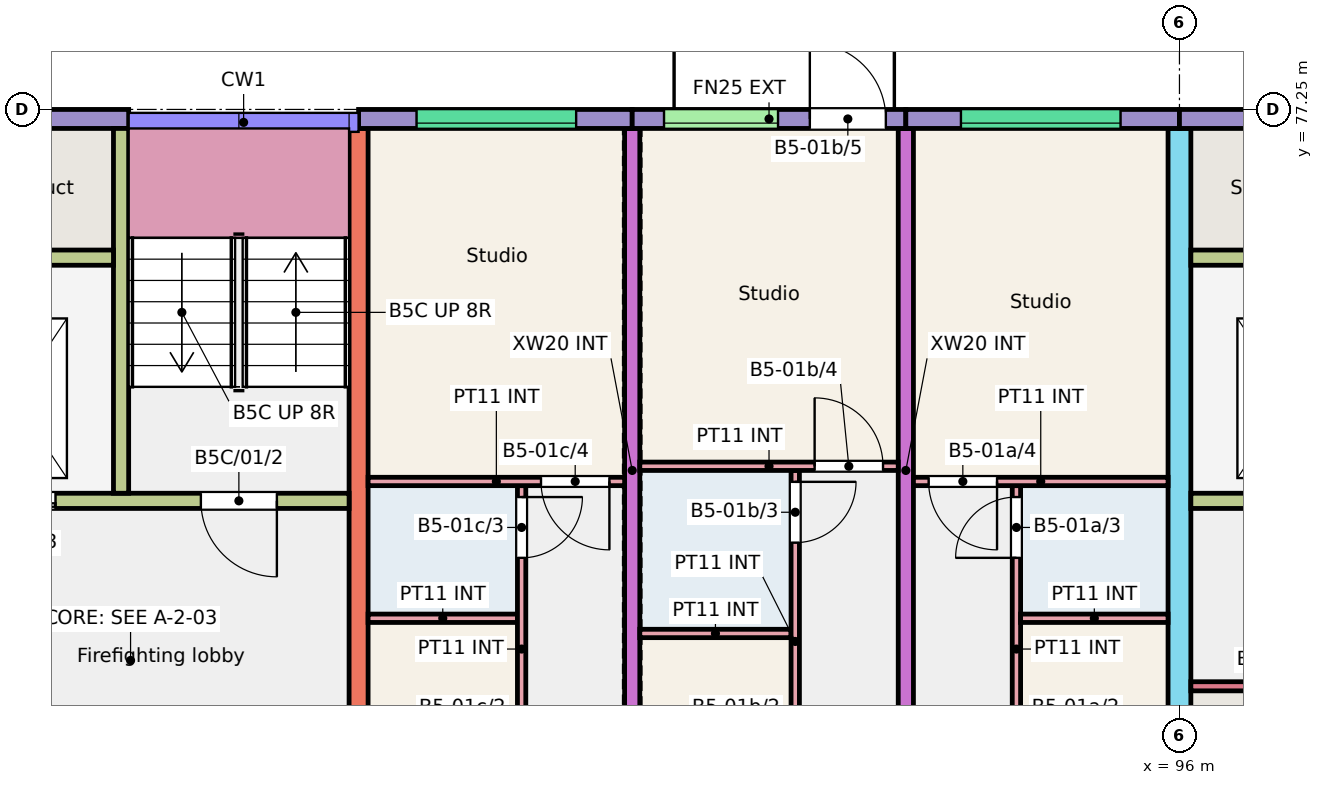
"""IFC4 building model, lengths in metres.
Left out: names, types, materials, properties, quantities, classifications, styles, units other than length and angle.
Written with IfcOpenShell. Run it as: python <this file> out.ifc"""

import sys

from ifc_helpers import new_model, si_unit, direction, frame, frame_2d, origin, place, context, subcontext, project, spatial, rectangle, extrude, element, fill, save


model = new_model("IFC4")
c1 = context("Model", 3, precision=1e-05, world=origin(), true_north=direction((0.0, 1.0)))
c2 = subcontext(c1, "Body", "Model", "MODEL_VIEW")
j1 = project(units=[si_unit("LENGTHUNIT", "METRE"), si_unit("PLANEANGLEUNIT", "RADIAN")], contexts=[c1])
p1 = place(None, origin())
s1 = spatial("IfcSite", under=j1, at=p1, CompositionType="ELEMENT")
p2 = place(p1, origin())
s2 = spatial("IfcBuilding", under=s1, at=p2, CompositionType="ELEMENT")
p3 = place(p2, frame((0.0, 0.0, 3.0)))
s3 = spatial("IfcBuildingStorey", under=s2, at=p3, CompositionType="ELEMENT", Elevation=3.0)
p4 = place(p3, frame((85.2, 68.0, 0.0), z_axis=(0.0, 0.0, 1.0), x_axis=(0.0, 1.0, 0.0)))
e1 = element("IfcWall", 1, at=p4, inside=s3, PredefinedType="SHEAR", context=c2, shape_type="SweptSolid", body=[
    extrude(rectangle(XDim=9.0, YDim=0.25, at=frame_2d((4.5, 0.0))), origin(), (0.0, 0.0, 1.0), 3.0),
])
for number, where, z_axis, x_axis in (
    (2, (88.8, 68.0, 0.0), (0.0, 0.0, 1.0), (0.0, 1.0, 0.0)),
    (3, (92.4, 68.0, 0.0), (0.0, 0.0, 1.0), (0.0, 1.0, 0.0)),
):
    element("IfcWall", number, at=place(p3, frame(where, z_axis=z_axis, x_axis=x_axis)), inside=s3, PredefinedType="SHEAR", context=c2, shape_type="SweptSolid", body=[
        extrude(rectangle(XDim=9.0, YDim=0.2, at=frame_2d((4.5, 0.0))), origin(), (0.0, 0.0, 1.0), 3.0),
    ])
p5 = place(p3, frame((96.0, 66.0, 0.0), z_axis=(0.0, 0.0, 1.0), x_axis=(0.0, 1.0, 0.0)))
e4 = element("IfcWall", 4, at=p5, inside=s3, PredefinedType="SHEAR", context=c2, shape_type="SweptSolid", body=[
    extrude(rectangle(XDim=11.0, YDim=0.3, at=frame_2d((5.5, 0.0))), origin(), (0.0, 0.0, 1.0), 3.0),
])
p6 = place(p5, frame((0.3, 0.0, 0.0)))
e5 = element("IfcOpeningElement", 5, at=p6, cuts=e4, PredefinedType="OPENING", context=c2, shape_type="SweptSolid", body=[
    extrude(rectangle(XDim=1.2, YDim=2.1, at=frame_2d((0.6, 1.05))), frame((0.0, 0.16, 0.0), z_axis=(0.0, -1.0, 0.0), x_axis=(1.0, 0.0, 0.0)), (0.0, 0.0, 1.0), 0.32),
])
p7 = place(p3, frame((79.2, 77.125, 0.0), z_axis=(0.0, 0.0, 1.0), x_axis=(1.0, 0.0, 0.0)))
e6 = element("IfcWall", 6, at=p7, inside=s3, PredefinedType="SOLIDWALL", context=c2, shape_type="SweptSolid", body=[
    extrude(rectangle(XDim=2.975, YDim=0.25, at=frame_2d((1.488, 0.0))), origin(), (0.0, 0.0, 1.0), 3.0),
])
p8 = place(p3, frame((79.35, 72.1, 0.0), z_axis=(0.0, 0.0, 1.0), x_axis=(1.0, 0.0, 0.0)))
e7 = element("IfcWall", 7, at=p8, inside=s3, PredefinedType="SHEAR", context=c2, shape_type="SweptSolid", body=[
    extrude(rectangle(XDim=5.725, YDim=0.2, at=frame_2d((2.862, 0.0))), origin(), (0.0, 0.0, 1.0), 3.0),
])
p9 = place(p8, frame((3.775, 0.0, 0.0)))
e8 = element("IfcOpeningElement", 8, at=p9, cuts=e7, PredefinedType="OPENING", context=c2, shape_type="SweptSolid", body=[
    extrude(rectangle(XDim=1.0, YDim=2.1, at=frame_2d((0.5, 1.05))), frame((0.0, 0.11, 0.0), z_axis=(0.0, -1.0, 0.0), x_axis=(1.0, 0.0, 0.0)), (0.0, 0.0, 1.0), 0.22),
])
p10 = place(p8, frame((0.762, 0.0, 0.0)))
e9 = element("IfcOpeningElement", 9, at=p10, cuts=e7, PredefinedType="OPENING", context=c2, shape_type="SweptSolid", body=[
    extrude(rectangle(XDim=1.1, YDim=2.1, at=frame_2d((0.55, 1.05))), frame((0.0, 0.11, 0.0), z_axis=(0.0, -1.0, 0.0), x_axis=(1.0, 0.0, 0.0)), (0.0, 0.0, 1.0), 0.22),
])
p11 = place(p3, frame((82.075, 72.2, 0.0), z_axis=(0.0, 0.0, 1.0), x_axis=(0.0, 1.0, 0.0)))
e10 = element("IfcWall", 10, at=p11, inside=s3, PredefinedType="SHEAR", context=c2, shape_type="SweptSolid", body=[
    extrude(rectangle(XDim=4.8, YDim=0.2, at=frame_2d((2.4, 0.0))), origin(), (0.0, 0.0, 1.0), 3.0),
])
p12 = place(p3, frame((79.35, 75.3, 0.0), z_axis=(0.0, 0.0, 1.0), x_axis=(1.0, 0.0, 0.0)))
e11 = element("IfcWall", 11, at=p12, inside=s3, PredefinedType="SHEAR", context=c2, shape_type="SweptSolid", body=[
    extrude(rectangle(XDim=2.625, YDim=0.2, at=frame_2d((1.312, 0.0))), origin(), (0.0, 0.0, 1.0), 3.0),
])
p13 = place(p3, frame((85.2, 77.125, 0.0), z_axis=(0.0, 0.0, 1.0), x_axis=(1.0, 0.0, 0.0)))
e12 = element("IfcWall", 12, at=p13, inside=s3, PredefinedType="SOLIDWALL", context=c2, shape_type="SweptSolid", body=[
    extrude(rectangle(XDim=3.6, YDim=0.25, at=frame_2d((1.8, 0.0))), origin(), (0.0, 0.0, 1.0), 3.0),
])
p14 = place(p13, frame((0.762, 0.0, 1.2)))
e13 = element("IfcOpeningElement", 13, at=p14, cuts=e12, PredefinedType="OPENING", context=c2, shape_type="SweptSolid", body=[
    extrude(rectangle(XDim=2.1, YDim=1.2, at=frame_2d((1.05, 0.6))), frame((0.0, 0.135, 0.0), z_axis=(0.0, -1.0, 0.0), x_axis=(1.0, 0.0, 0.0)), (0.0, 0.0, 1.0), 0.27),
])
p15 = place(p3, frame((88.8, 77.125, 0.0), z_axis=(0.0, 0.0, 1.0), x_axis=(1.0, 0.0, 0.0)))
e14 = element("IfcWall", 14, at=p15, inside=s3, PredefinedType="SOLIDWALL", context=c2, shape_type="SweptSolid", body=[
    extrude(rectangle(XDim=3.6, YDim=0.25, at=frame_2d((1.8, 0.0))), origin(), (0.0, 0.0, 1.0), 3.0),
])
p16 = place(p15, frame((0.418, 0.0, 1.2)))
e15 = element("IfcOpeningElement", 15, at=p16, cuts=e14, PredefinedType="OPENING", context=c2, shape_type="SweptSolid", body=[
    extrude(rectangle(XDim=1.5, YDim=1.2, at=frame_2d((0.75, 0.6))), frame((0.0, 0.135, 0.0), z_axis=(0.0, -1.0, 0.0), x_axis=(1.0, 0.0, 0.0)), (0.0, 0.0, 1.0), 0.27),
])
p17 = place(p15, frame((2.337, 0.0, 0.0)))
e16 = element("IfcOpeningElement", 16, at=p17, cuts=e14, PredefinedType="OPENING", context=c2, shape_type="SweptSolid", body=[
    extrude(rectangle(XDim=1.0, YDim=2.1, at=frame_2d((0.5, 1.05))), frame((0.0, 0.135, 0.0), z_axis=(0.0, -1.0, 0.0), x_axis=(1.0, 0.0, 0.0)), (0.0, 0.0, 1.0), 0.27),
])
p18 = place(p3, frame((92.4, 77.125, 0.0), z_axis=(0.0, 0.0, 1.0), x_axis=(1.0, 0.0, 0.0)))
e17 = element("IfcWall", 17, at=p18, inside=s3, PredefinedType="SOLIDWALL", context=c2, shape_type="SweptSolid", body=[
    extrude(rectangle(XDim=3.6, YDim=0.25, at=frame_2d((1.8, 0.0))), origin(), (0.0, 0.0, 1.0), 3.0),
])
p19 = place(p18, frame((0.725, 0.0, 1.2)))
e18 = element("IfcOpeningElement", 18, at=p19, cuts=e17, PredefinedType="OPENING", context=c2, shape_type="SweptSolid", body=[
    extrude(rectangle(XDim=2.1, YDim=1.2, at=frame_2d((1.05, 0.6))), frame((0.0, 0.135, 0.0), z_axis=(0.0, -1.0, 0.0), x_axis=(1.0, 0.0, 0.0)), (0.0, 0.0, 1.0), 0.27),
])
p20 = place(p3, frame((96.0, 77.125, 0.0), z_axis=(0.0, 0.0, 1.0), x_axis=(1.0, 0.0, 0.0)))
e19 = element("IfcWall", 19, at=p20, inside=s3, PredefinedType="SOLIDWALL", context=c2, shape_type="SweptSolid", body=[
    extrude(rectangle(XDim=2.975, YDim=0.25, at=frame_2d((1.488, 0.0))), origin(), (0.0, 0.0, 1.0), 3.0),
])
p21 = place(p3, frame((96.15, 72.1, 0.0), z_axis=(0.0, 0.0, 1.0), x_axis=(1.0, 0.0, 0.0)))
e20 = element("IfcWall", 20, at=p21, inside=s3, PredefinedType="SHEAR", context=c2, shape_type="SweptSolid", body=[
    extrude(rectangle(XDim=5.725, YDim=0.2, at=frame_2d((2.863, 0.0))), origin(), (0.0, 0.0, 1.0), 3.0),
])
p22 = place(p21, frame((3.775, 0.0, 0.0)))
e21 = element("IfcOpeningElement", 21, at=p22, cuts=e20, PredefinedType="OPENING", context=c2, shape_type="SweptSolid", body=[
    extrude(rectangle(XDim=1.0, YDim=2.1, at=frame_2d((0.5, 1.05))), frame((0.0, 0.11, 0.0), z_axis=(0.0, -1.0, 0.0), x_axis=(1.0, 0.0, 0.0)), (0.0, 0.0, 1.0), 0.22),
])
p23 = place(p21, frame((0.762, 0.0, 0.0)))
e22 = element("IfcOpeningElement", 22, at=p23, cuts=e20, PredefinedType="OPENING", context=c2, shape_type="SweptSolid", body=[
    extrude(rectangle(XDim=1.1, YDim=2.1, at=frame_2d((0.55, 1.05))), frame((0.0, 0.11, 0.0), z_axis=(0.0, -1.0, 0.0), x_axis=(1.0, 0.0, 0.0)), (0.0, 0.0, 1.0), 0.22),
])
p24 = place(p3, frame((96.15, 75.3, 0.0), z_axis=(0.0, 0.0, 1.0), x_axis=(1.0, 0.0, 0.0)))
e23 = element("IfcWall", 23, at=p24, inside=s3, PredefinedType="SHEAR", context=c2, shape_type="SweptSolid", body=[
    extrude(rectangle(XDim=2.625, YDim=0.2, at=frame_2d((1.312, 0.0))), origin(), (0.0, 0.0, 1.0), 3.0),
])
p25 = place(p3, frame((96.15, 69.66, 0.0), z_axis=(0.0, 0.0, 1.0), x_axis=(1.0, 0.0, 0.0)))
e24 = element("IfcWall", 24, at=p25, inside=s3, PredefinedType="SHEAR", context=c2, shape_type="SweptSolid", body=[
    extrude(rectangle(XDim=1.13, YDim=0.12, at=frame_2d((0.565, 0.0))), origin(), (0.0, 0.0, 1.0), 3.0),
])
p26 = place(p3, frame((93.855, 68.0, 0.0), z_axis=(0.0, 0.0, 1.0), x_axis=(0.0, 1.0, 0.0)))
e25 = element("IfcWall", 25, at=p26, inside=s3, PredefinedType="PARTITIONING", context=c2, shape_type="SweptSolid", body=[
    extrude(rectangle(XDim=4.3, YDim=0.11, at=frame_2d((2.15, 0.0))), origin(), (0.0, 0.0, 1.0), 2.8),
])
p27 = place(p26, frame((0.2, 0.0, 0.0)))
e26 = element("IfcOpeningElement", 26, at=p27, cuts=e25, PredefinedType="OPENING", context=c2, shape_type="SweptSolid", body=[
    extrude(rectangle(XDim=0.8, YDim=2.1, at=frame_2d((0.4, 1.05))), frame((0.0, 0.065, 0.0), z_axis=(0.0, -1.0, 0.0), x_axis=(1.0, 0.0, 0.0)), (0.0, 0.0, 1.0), 0.13),
])
p28 = place(p26, frame((3.35, 0.0, 0.0)))
e27 = element("IfcOpeningElement", 27, at=p28, cuts=e25, PredefinedType="OPENING", context=c2, shape_type="SweptSolid", body=[
    extrude(rectangle(XDim=0.8, YDim=2.1, at=frame_2d((0.4, 1.05))), frame((0.0, 0.065, 0.0), z_axis=(0.0, -1.0, 0.0), x_axis=(1.0, 0.0, 0.0)), (0.0, 0.0, 1.0), 0.13),
])
p29 = place(p3, frame((93.91, 70.555, 0.0), z_axis=(0.0, 0.0, 1.0), x_axis=(1.0, 0.0, 0.0)))
e28 = element("IfcWall", 28, at=p29, inside=s3, PredefinedType="PARTITIONING", context=c2, shape_type="SweptSolid", body=[
    extrude(rectangle(XDim=1.94, YDim=0.11, at=frame_2d((0.97, 0.0))), origin(), (0.0, 0.0, 1.0), 2.8),
])
p30 = place(p3, frame((92.5, 72.355, 0.0), z_axis=(0.0, 0.0, 1.0), x_axis=(1.0, 0.0, 0.0)))
e29 = element("IfcWall", 29, at=p30, inside=s3, PredefinedType="PARTITIONING", context=c2, shape_type="SweptSolid", body=[
    extrude(rectangle(XDim=3.35, YDim=0.11, at=frame_2d((1.675, 0.0))), origin(), (0.0, 0.0, 1.0), 2.8),
])
p31 = place(p30, frame((0.2, 0.0, 0.0)))
e30 = element("IfcOpeningElement", 30, at=p31, cuts=e29, PredefinedType="OPENING", context=c2, shape_type="SweptSolid", body=[
    extrude(rectangle(XDim=0.9, YDim=2.1, at=frame_2d((0.45, 1.05))), frame((0.0, 0.065, 0.0), z_axis=(0.0, -1.0, 0.0), x_axis=(1.0, 0.0, 0.0)), (0.0, 0.0, 1.0), 0.13),
])
p32 = place(p3, frame((88.9, 70.355, 0.0), z_axis=(0.0, 0.0, 1.0), x_axis=(1.0, 0.0, 0.0)))
e31 = element("IfcWall", 31, at=p32, inside=s3, PredefinedType="PARTITIONING", context=c2, shape_type="SweptSolid", body=[
    extrude(rectangle(XDim=1.99, YDim=0.11, at=frame_2d((0.995, 0.0))), origin(), (0.0, 0.0, 1.0), 2.8),
])
p33 = place(p3, frame((90.945, 68.0, 0.0), z_axis=(0.0, 0.0, 1.0), x_axis=(0.0, 1.0, 0.0)))
e32 = element("IfcWall", 32, at=p33, inside=s3, PredefinedType="PARTITIONING", context=c2, shape_type="SweptSolid", body=[
    extrude(rectangle(XDim=4.5, YDim=0.11, at=frame_2d((2.25, 0.0))), origin(), (0.0, 0.0, 1.0), 2.8),
])
p34 = place(p33, frame((0.2, 0.0, 0.0)))
e33 = element("IfcOpeningElement", 33, at=p34, cuts=e32, PredefinedType="OPENING", context=c2, shape_type="SweptSolid", body=[
    extrude(rectangle(XDim=0.8, YDim=2.1, at=frame_2d((0.4, 1.05))), frame((0.0, 0.065, 0.0), z_axis=(0.0, -1.0, 0.0), x_axis=(1.0, 0.0, 0.0)), (0.0, 0.0, 1.0), 0.13),
])
p35 = place(p33, frame((3.55, 0.0, 0.0)))
e34 = element("IfcOpeningElement", 34, at=p35, cuts=e32, PredefinedType="OPENING", context=c2, shape_type="SweptSolid", body=[
    extrude(rectangle(XDim=0.8, YDim=2.1, at=frame_2d((0.4, 1.05))), frame((0.0, 0.065, 0.0), z_axis=(0.0, -1.0, 0.0), x_axis=(1.0, 0.0, 0.0)), (0.0, 0.0, 1.0), 0.13),
])
p36 = place(p3, frame((88.9, 72.555, 0.0), z_axis=(0.0, 0.0, 1.0), x_axis=(1.0, 0.0, 0.0)))
e35 = element("IfcWall", 35, at=p36, inside=s3, PredefinedType="PARTITIONING", context=c2, shape_type="SweptSolid", body=[
    extrude(rectangle(XDim=3.4, YDim=0.11, at=frame_2d((1.7, 0.0))), origin(), (0.0, 0.0, 1.0), 2.8),
])
p37 = place(p36, frame((2.3, 0.0, 0.0)))
e36 = element("IfcOpeningElement", 36, at=p37, cuts=e35, PredefinedType="OPENING", context=c2, shape_type="SweptSolid", body=[
    extrude(rectangle(XDim=0.9, YDim=2.1, at=frame_2d((0.45, 1.05))), frame((0.0, 0.065, 0.0), z_axis=(0.0, -1.0, 0.0), x_axis=(1.0, 0.0, 0.0)), (0.0, 0.0, 1.0), 0.13),
])
p38 = place(p3, frame((85.325, 70.555, 0.0), z_axis=(0.0, 0.0, 1.0), x_axis=(1.0, 0.0, 0.0)))
e37 = element("IfcWall", 37, at=p38, inside=s3, PredefinedType="PARTITIONING", context=c2, shape_type="SweptSolid", body=[
    extrude(rectangle(XDim=1.965, YDim=0.11, at=frame_2d((0.982, 0.0))), origin(), (0.0, 0.0, 1.0), 2.8),
])
p39 = place(p3, frame((87.345, 68.0, 0.0), z_axis=(0.0, 0.0, 1.0), x_axis=(0.0, 1.0, 0.0)))
e38 = element("IfcWall", 38, at=p39, inside=s3, PredefinedType="PARTITIONING", context=c2, shape_type="SweptSolid", body=[
    extrude(rectangle(XDim=4.3, YDim=0.11, at=frame_2d((2.15, 0.0))), origin(), (0.0, 0.0, 1.0), 2.8),
])
p40 = place(p39, frame((0.2, 0.0, 0.0)))
e39 = element("IfcOpeningElement", 39, at=p40, cuts=e38, PredefinedType="OPENING", context=c2, shape_type="SweptSolid", body=[
    extrude(rectangle(XDim=0.8, YDim=2.1, at=frame_2d((0.4, 1.05))), frame((0.0, 0.065, 0.0), z_axis=(0.0, -1.0, 0.0), x_axis=(1.0, 0.0, 0.0)), (0.0, 0.0, 1.0), 0.13),
])
p41 = place(p39, frame((3.35, 0.0, 0.0)))
e40 = element("IfcOpeningElement", 40, at=p41, cuts=e38, PredefinedType="OPENING", context=c2, shape_type="SweptSolid", body=[
    extrude(rectangle(XDim=0.8, YDim=2.1, at=frame_2d((0.4, 1.05))), frame((0.0, 0.065, 0.0), z_axis=(0.0, -1.0, 0.0), x_axis=(1.0, 0.0, 0.0)), (0.0, 0.0, 1.0), 0.13),
])
p42 = place(p3, frame((85.325, 72.355, 0.0), z_axis=(0.0, 0.0, 1.0), x_axis=(1.0, 0.0, 0.0)))
e41 = element("IfcWall", 41, at=p42, inside=s3, PredefinedType="PARTITIONING", context=c2, shape_type="SweptSolid", body=[
    extrude(rectangle(XDim=3.375, YDim=0.11, at=frame_2d((1.688, 0.0))), origin(), (0.0, 0.0, 1.0), 2.8),
])
p43 = place(p42, frame((2.275, 0.0, 0.0)))
e42 = element("IfcOpeningElement", 42, at=p43, cuts=e41, PredefinedType="OPENING", context=c2, shape_type="SweptSolid", body=[
    extrude(rectangle(XDim=0.9, YDim=2.1, at=frame_2d((0.45, 1.05))), frame((0.0, 0.065, 0.0), z_axis=(0.0, -1.0, 0.0), x_axis=(1.0, 0.0, 0.0)), (0.0, 0.0, 1.0), 0.13),
])
p44 = place(p19, origin())
e43 = element("IfcWindow", 43, at=p44, inside=s3, PartitioningType="SINGLE_PANEL", PredefinedType="WINDOW", context=c2, shape_type="SweptSolid", body=[
    extrude(rectangle(XDim=2.1, YDim=1.2, at=frame_2d((1.05, 0.6))), frame((0.0, -0.025, 0.0), z_axis=(0.0, -1.0, 0.0), x_axis=(1.0, 0.0, 0.0)), (0.0, 0.0, 1.0), 0.06),
])
fill(e18, e43)
p45 = place(p16, origin())
e44 = element("IfcWindow", 44, at=p45, inside=s3, PartitioningType="SINGLE_PANEL", PredefinedType="WINDOW", context=c2, shape_type="SweptSolid", body=[
    extrude(rectangle(XDim=1.5, YDim=1.2, at=frame_2d((0.75, 0.6))), frame((0.0, -0.025, 0.0), z_axis=(0.0, -1.0, 0.0), x_axis=(1.0, 0.0, 0.0)), (0.0, 0.0, 1.0), 0.06),
])
fill(e15, e44)
p46 = place(p14, origin())
e45 = element("IfcWindow", 45, at=p46, inside=s3, PartitioningType="SINGLE_PANEL", PredefinedType="WINDOW", context=c2, shape_type="SweptSolid", body=[
    extrude(rectangle(XDim=2.1, YDim=1.2, at=frame_2d((1.05, 0.6))), frame((0.0, -0.025, 0.0), z_axis=(0.0, -1.0, 0.0), x_axis=(1.0, 0.0, 0.0)), (0.0, 0.0, 1.0), 0.06),
])
fill(e13, e45)
p47 = place(p28, origin())
e46 = element("IfcDoor", 46, at=p47, inside=s3, OperationType="SINGLE_SWING_LEFT", PredefinedType="DOOR", context=c2, shape_type="SweptSolid", body=[
    extrude(rectangle(XDim=0.8, YDim=2.1, at=frame_2d((0.4, 1.05))), frame((0.0, 0.025, 0.0), z_axis=(0.0, -1.0, 0.0), x_axis=(1.0, 0.0, 0.0)), (0.0, 0.0, 1.0), 0.05),
])
fill(e27, e46)
p48 = place(p31, origin())
e47 = element("IfcDoor", 47, at=p48, inside=s3, OperationType="SINGLE_SWING_RIGHT", PredefinedType="DOOR", context=c2, shape_type="SweptSolid", body=[
    extrude(rectangle(XDim=0.9, YDim=2.1, at=frame_2d((0.45, 1.05))), frame((0.0, 0.025, 0.0), z_axis=(0.0, -1.0, 0.0), x_axis=(1.0, 0.0, 0.0)), (0.0, 0.0, 1.0), 0.05),
])
fill(e30, e47)
p49 = place(p35, origin())
e48 = element("IfcDoor", 48, at=p49, inside=s3, OperationType="SINGLE_SWING_RIGHT", PredefinedType="DOOR", context=c2, shape_type="SweptSolid", body=[
    extrude(rectangle(XDim=0.8, YDim=2.1, at=frame_2d((0.4, 1.05))), frame((0.0, 0.025, 0.0), z_axis=(0.0, -1.0, 0.0), x_axis=(1.0, 0.0, 0.0)), (0.0, 0.0, 1.0), 0.05),
])
fill(e34, e48)
p50 = place(p37, origin())
e49 = element("IfcDoor", 49, at=p50, inside=s3, OperationType="SINGLE_SWING_LEFT", PredefinedType="DOOR", context=c2, shape_type="SweptSolid", body=[
    extrude(rectangle(XDim=0.9, YDim=2.1, at=frame_2d((0.45, 1.05))), frame((0.0, 0.025, 0.0), z_axis=(0.0, -1.0, 0.0), x_axis=(1.0, 0.0, 0.0)), (0.0, 0.0, 1.0), 0.05),
])
fill(e36, e49)
p51 = place(p17, origin())
e50 = element("IfcDoor", 50, at=p51, inside=s3, OperationType="SINGLE_SWING_LEFT", PredefinedType="DOOR", context=c2, shape_type="SweptSolid", body=[
    extrude(rectangle(XDim=1.0, YDim=2.1, at=frame_2d((0.5, 1.05))), frame((0.0, 0.025, 0.0), z_axis=(0.0, -1.0, 0.0), x_axis=(1.0, 0.0, 0.0)), (0.0, 0.0, 1.0), 0.05),
])
fill(e16, e50)
p52 = place(p41, origin())
e51 = element("IfcDoor", 51, at=p52, inside=s3, OperationType="SINGLE_SWING_RIGHT", PredefinedType="DOOR", context=c2, shape_type="SweptSolid", body=[
    extrude(rectangle(XDim=0.8, YDim=2.1, at=frame_2d((0.4, 1.05))), frame((0.0, 0.025, 0.0), z_axis=(0.0, -1.0, 0.0), x_axis=(1.0, 0.0, 0.0)), (0.0, 0.0, 1.0), 0.05),
])
fill(e40, e51)
p53 = place(p43, origin())
e52 = element("IfcDoor", 52, at=p53, inside=s3, OperationType="SINGLE_SWING_RIGHT", PredefinedType="DOOR", context=c2, shape_type="SweptSolid", body=[
    extrude(rectangle(XDim=0.9, YDim=2.1, at=frame_2d((0.45, 1.05))), frame((0.0, 0.025, 0.0), z_axis=(0.0, -1.0, 0.0), x_axis=(1.0, 0.0, 0.0)), (0.0, 0.0, 1.0), 0.05),
])
fill(e42, e52)
p54 = place(p9, origin())
e53 = element("IfcDoor", 53, at=p54, inside=s3, OperationType="SINGLE_SWING_RIGHT", PredefinedType="DOOR", context=c2, shape_type="SweptSolid", body=[
    extrude(rectangle(XDim=1.0, YDim=2.1, at=frame_2d((0.5, 1.05))), frame((0.0, 0.025, 0.0), z_axis=(0.0, -1.0, 0.0), x_axis=(1.0, 0.0, 0.0)), (0.0, 0.0, 1.0), 0.05),
])
fill(e8, e53)
p55 = place(p10, origin())
e54 = element("IfcDoor", 54, at=p55, inside=s3, OperationType="DOUBLE_DOOR_SLIDING", PredefinedType="DOOR", context=c2, shape_type="SweptSolid", body=[
    extrude(rectangle(XDim=1.1, YDim=2.1, at=frame_2d((0.55, 1.05))), frame((0.0, 0.025, 0.0), z_axis=(0.0, -1.0, 0.0), x_axis=(1.0, 0.0, 0.0)), (0.0, 0.0, 1.0), 0.05),
])
fill(e9, e54)
save(model, sys.argv[1])
